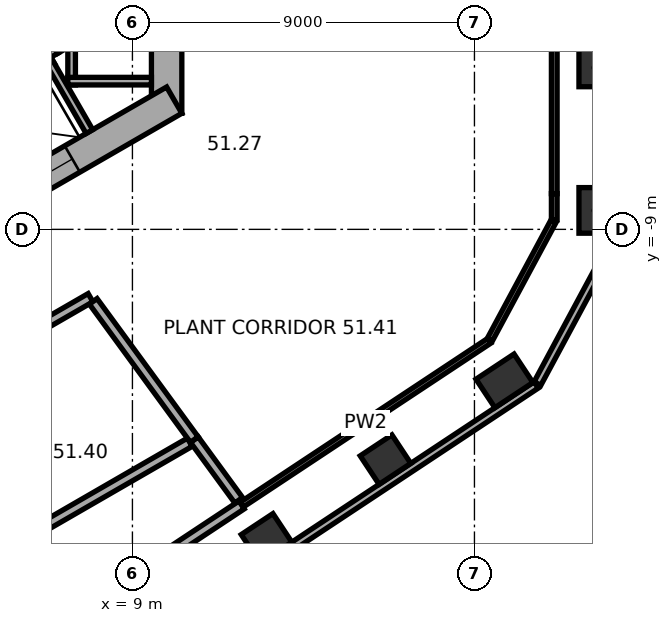
"""IFC4 building model, lengths in metres.
Left out: names, types, materials, properties, quantities, classifications, styles, units other than length and angle.
Written with IfcOpenShell. Run it as: python <this file> out.ifc"""

import sys

from ifc_helpers import new_model, si_unit, direction, frame, frame_2d, origin, origin_2d, place, context, subcontext, project, spatial, rectangle, extrude, element, fill, save


model = new_model("IFC4")
c1 = context("Model", 3, precision=1e-05, world=origin(), true_north=direction((0.0, 1.0)))
c2 = subcontext(c1, "Body", "Model", "MODEL_VIEW")
j1 = project(units=[si_unit("LENGTHUNIT", "METRE"), si_unit("PLANEANGLEUNIT", "RADIAN")], contexts=[c1])
p1 = place(None, origin())
s1 = spatial("IfcSite", under=j1, at=p1, CompositionType="ELEMENT")
p2 = place(p1, origin())
s2 = spatial("IfcBuilding", under=s1, at=p2, CompositionType="ELEMENT")
p3 = place(p2, frame((0.0, 0.0, 205.8)))
s3 = spatial("IfcBuildingStorey", under=s2, at=p3, CompositionType="ELEMENT", Elevation=205.8)
p4 = place(p3, frame((21.2, -8.501, 0.0), z_axis=(0.0, 0.0, 1.0), x_axis=(0.0, 1.0, 0.0)))
e1 = element("IfcColumn", 1, at=p4, inside=s3, PredefinedType="COLUMN", context=c2, shape_type="SweptSolid", body=[
    extrude(rectangle(XDim=1.2, YDim=0.9, at=origin_2d()), origin(), (0.0, 0.0, 1.0), 4.8),
])
for number, where, z_axis, x_axis in (
    (2, (21.2, -4.747, 0.0), (0.0, 0.0, 1.0), (0.0, 1.0, 0.0)),
    (3, (12.529, -17.13, 0.0), (0.0, 0.0, 1.0), (0.834, 0.552, 0.0)),
    (4, (15.659, -15.058, 0.0), (0.0, 0.0, 1.0), (0.834, 0.552, 0.0)),
):
    element("IfcColumn", number, at=place(p3, frame(where, z_axis=z_axis, x_axis=x_axis)), inside=s3, PredefinedType="COLUMN", context=c2, shape_type="SweptSolid", body=[
        extrude(rectangle(XDim=1.0, YDim=0.9, at=origin_2d()), origin(), (0.0, 0.0, 1.0), 4.8),
    ])
p5 = place(p3, frame((18.79, -12.986, 0.0), z_axis=(0.0, 0.0, 1.0), x_axis=(0.833885822067, 0.551936985312, 0.0)))
e5 = element("IfcColumn", 5, at=p5, inside=s3, PredefinedType="COLUMN", context=c2, shape_type="SweptSolid", body=[
    extrude(rectangle(XDim=1.2, YDim=0.9, at=origin_2d()), origin(), (0.0, 0.0, 1.0), 4.8),
])
p6 = place(p3, frame((9.9, -5.947, 0.0), z_axis=(0.0, 0.0, 1.0), x_axis=(0.0, 1.0, 0.0)))
e6 = element("IfcWall", 6, at=p6, inside=s3, PredefinedType="SHEAR", context=c2, shape_type="SweptSolid", body=[
    extrude(rectangle(XDim=11.894, YDim=0.8, at=frame_2d((5.947, 0.0))), origin(), (0.0, 0.0, 1.0), 4.8),
])
p7 = place(p6, frame((6.147, 0.0, 0.0)))
e7 = element("IfcOpeningElement", 7, at=p7, cuts=e6, PredefinedType="OPENING", context=c2, shape_type="SweptSolid", body=[
    extrude(rectangle(XDim=1.5, YDim=2.1, at=frame_2d((0.75, 1.05))), frame((0.0, 0.41, 0.0), z_axis=(0.0, -1.0, 0.0), x_axis=(1.0, 0.0, 0.0)), (0.0, 0.0, 1.0), 0.82),
])
p8 = place(p6, frame((2.997, 0.0, 0.0)))
e8 = element("IfcOpeningElement", 8, at=p8, cuts=e6, PredefinedType="OPENING", context=c2, shape_type="SweptSolid", body=[
    extrude(rectangle(XDim=0.9, YDim=2.1, at=frame_2d((0.45, 1.05))), frame((0.0, 0.41, 0.0), z_axis=(0.0, -1.0, 0.0), x_axis=(1.0, 0.0, 0.0)), (0.0, 0.0, 1.0), 0.82),
])
p9 = place(p3, frame((-0.2, -11.547, 0.0), z_axis=(0.0, 0.0, 1.0), x_axis=(0.866023897231, 0.500002609418, 0.0)))
e9 = element("IfcWall", 9, at=p9, inside=s3, PredefinedType="SHEAR", context=c2, shape_type="SweptSolid", body=[
    extrude(rectangle(XDim=11.894, YDim=0.8, at=frame_2d((5.947, 0.0))), origin(), (0.0, 0.0, 1.0), 4.8),
])
p10 = place(p9, frame((2.497, 0.0, 0.0)))
e10 = element("IfcOpeningElement", 10, at=p10, cuts=e9, PredefinedType="OPENING", context=c2, shape_type="SweptSolid", body=[
    extrude(rectangle(XDim=1.1, YDim=2.1, at=frame_2d((0.55, 1.05))), frame((0.0, 0.41, 0.0), z_axis=(0.0, -1.0, 0.0), x_axis=(1.0, 0.0, 0.0)), (0.0, 0.0, 1.0), 0.82),
])
p11 = place(p9, frame((5.097, 0.0, 0.0)))
e11 = element("IfcOpeningElement", 11, at=p11, cuts=e9, PredefinedType="OPENING", context=c2, shape_type="SweptSolid", body=[
    extrude(rectangle(XDim=1.1, YDim=2.1, at=frame_2d((0.55, 1.05))), frame((0.0, 0.41, 0.0), z_axis=(0.0, -1.0, 0.0), x_axis=(1.0, 0.0, 0.0)), (0.0, 0.0, 1.0), 0.82),
])
p12 = place(p9, frame((7.697, 0.0, 0.0)))
e12 = element("IfcOpeningElement", 12, at=p12, cuts=e9, PredefinedType="OPENING", context=c2, shape_type="SweptSolid", body=[
    extrude(rectangle(XDim=1.1, YDim=2.1, at=frame_2d((0.55, 1.05))), frame((0.0, 0.41, 0.0), z_axis=(0.0, -1.0, 0.0), x_axis=(1.0, 0.0, 0.0)), (0.0, 0.0, 1.0), 0.82),
])
p13 = place(p3, frame((2.911, -24.156, 0.0), z_axis=(0.0, 0.0, 1.0), x_axis=(0.833882163564, 0.551942512668, 0.0)))
e13 = element("IfcWall", 13, at=p13, inside=s3, PredefinedType="STANDARD", context=c2, shape_type="SweptSolid", body=[
    extrude(rectangle(XDim=20.044, YDim=0.2, at=frame_2d((10.022, 0.0))), origin(), (0.0, 0.0, 1.0), 4.8),
])
p14 = place(p3, frame((19.658, -13.057, 0.0), z_axis=(0.0, 0.0, 1.0), x_axis=(0.473307879841, 0.880897071672, 0.0)))
e14 = element("IfcWall", 14, at=p14, inside=s3, PredefinedType="STANDARD", context=c2, shape_type="SweptSolid", body=[
    extrude(rectangle(XDim=4.395, YDim=0.2, at=frame_2d((2.197, 0.0))), origin(), (0.0, 0.0, 1.0), 4.8),
])
p15 = place(p3, frame((7.4, -5.2, 0.0), z_axis=(0.0, 0.0, 1.0), x_axis=(0.0, 1.0, 0.0)))
e15 = element("IfcWall", 15, at=p15, inside=s3, PredefinedType="PARTITIONING", context=c2, shape_type="SweptSolid", body=[
    extrude(rectangle(XDim=5.4, YDim=0.2, at=frame_2d((2.7, 0.0))), origin(), (0.0, 0.0, 1.0), 4.52),
])
p16 = place(p3, frame((7.3, -5.1, 0.0), z_axis=(0.0, 0.0, 1.0), x_axis=(1.0, 0.0, 0.0)))
e16 = element("IfcWall", 16, at=p16, inside=s3, PredefinedType="PARTITIONING", context=c2, shape_type="SweptSolid", body=[
    extrude(rectangle(XDim=2.2, YDim=0.2, at=frame_2d((1.1, 0.0))), origin(), (0.0, 0.0, 1.0), 4.52),
])
p17 = place(p3, frame((-0.024, -8.559, 0.0), z_axis=(0.0, 0.0, 1.0), x_axis=(0.866026010844, 0.49999894854, 0.0)))
e17 = element("IfcWall", 17, at=p17, inside=s3, PredefinedType="PARTITIONING", context=c2, shape_type="SweptSolid", body=[
    extrude(rectangle(XDim=8.0, YDim=0.2, at=frame_2d((4.0, 0.0))), origin(), (0.0, 0.0, 1.0), 4.52),
])
p18 = place(p3, frame((6.768, -4.522, 0.0), z_axis=(0.0, 0.0, 1.0), x_axis=(0.50002983664, -0.866008176907, 0.0)))
e18 = element("IfcWall", 18, at=p18, inside=s3, PredefinedType="PARTITIONING", context=c2, shape_type="SweptSolid", body=[
    extrude(rectangle(XDim=2.2, YDim=0.2, at=frame_2d((1.1, 0.0))), origin(), (0.0, 0.0, 1.0), 4.52),
])
p19 = place(p3, frame((4.816, -0.222, 0.0), z_axis=(0.0, 0.0, 1.0), x_axis=(0.499977259774, -0.866038532462, 0.0)))
e19 = element("IfcWall", 19, at=p19, inside=s3, PredefinedType="SHEAR", context=c2, shape_type="SweptSolid", body=[
    extrude(rectangle(XDim=4.7, YDim=0.3, at=frame_2d((2.35, 0.0))), origin(), (0.0, 0.0, 1.0), 4.52),
])
p20 = place(p3, frame((0.847, -7.767, 0.0), z_axis=(0.0, 0.0, 1.0), x_axis=(0.866027801685, 0.499995846692, 0.0)))
e20 = element("IfcWall", 20, at=p20, inside=s3, PredefinedType="SHEAR", context=c2, shape_type="SweptSolid", body=[
    extrude(rectangle(XDim=7.06, YDim=0.3, at=frame_2d((3.53, 0.0))), origin(), (0.0, 0.0, 1.0), 4.52),
])
p21 = place(p3, frame((11.873, -16.251, 0.0), z_axis=(0.0, 0.0, 1.0), x_axis=(-0.833861924464, -0.551973088953, 0.0)))
e21 = element("IfcWall", 21, at=p21, inside=s3, PredefinedType="SOLIDWALL", context=c2, shape_type="SweptSolid", body=[
    extrude(rectangle(XDim=10.651, YDim=0.25, at=frame_2d((5.326, 0.0))), origin(), (0.0, 0.0, 1.0), 4.02),
])
p22 = place(p3, frame((11.796, -16.128, 0.0), z_axis=(0.0, 0.0, 1.0), x_axis=(-0.59041584791, 0.807099204891, 0.0)))
e22 = element("IfcWall", 22, at=p22, inside=s3, PredefinedType="SOLIDWALL", context=c2, shape_type="SweptSolid", body=[
    extrude(rectangle(XDim=1.977, YDim=0.25, at=frame_2d((0.989, 0.0))), origin(), (0.0, 0.0, 1.0), 3.6),
])
p23 = place(p3, frame((10.508, -14.603, 0.0), z_axis=(0.0, 0.0, 1.0), x_axis=(-0.86603774239, -0.499978628299, 0.0)))
e23 = element("IfcWall", 23, at=p23, inside=s3, PredefinedType="SOLIDWALL", context=c2, shape_type="SweptSolid", body=[
    extrude(rectangle(XDim=9.157, YDim=0.25, at=frame_2d((4.579, 0.0))), origin(), (0.0, 0.0, 1.0), 4.52),
])
p24 = place(p3, frame((4.99, -12.476, 0.0), z_axis=(0.0, 0.0, 1.0), x_axis=(0.86607294768, 0.499917642513, 0.0)))
e24 = element("IfcWall", 24, at=p24, inside=s3, PredefinedType="SOLIDWALL", context=c2, shape_type="SweptSolid", body=[
    extrude(rectangle(XDim=3.356, YDim=0.25, at=frame_2d((1.678, 0.0))), origin(), (0.0, 0.0, 1.0), 4.52),
])
p25 = place(p3, frame((18.389, -11.933, 0.0), z_axis=(0.0, 0.0, 1.0), x_axis=(-0.833883730821, -0.551940144827, 0.0)))
e25 = element("IfcWall", 25, at=p25, inside=s3, PredefinedType="PARTITIONING", context=c2, shape_type="SweptSolid", body=[
    extrude(rectangle(XDim=7.806, YDim=0.15, at=frame_2d((3.903, 0.0))), origin(), (0.0, 0.0, 1.0), 4.02),
])
p26 = place(p3, frame((7.968, -10.895, 0.0), z_axis=(0.0, 0.0, 1.0), x_axis=(0.590348117022, -0.807148747585, 0.0)))
e26 = element("IfcWall", 26, at=p26, inside=s3, PredefinedType="SOLIDWALL", context=c2, shape_type="SweptSolid", body=[
    extrude(rectangle(XDim=4.504, YDim=0.25, at=frame_2d((2.252, 0.0))), origin(), (0.0, 0.0, 1.0), 3.6),
])
p27 = place(p3, frame((20.081, -8.784, 0.0), z_axis=(0.0, 0.0, 1.0), x_axis=(-0.473349998863, -0.880874439734, 0.0)))
e27 = element("IfcWall", 27, at=p27, inside=s3, PredefinedType="PARTITIONING", context=c2, shape_type="SweptSolid", body=[
    extrude(rectangle(XDim=3.535, YDim=0.15, at=frame_2d((1.767, 0.0))), origin(), (0.0, 0.0, 1.0), 4.52),
])
p28 = place(p3, frame((20.1, -8.06, 0.0), z_axis=(0.0, 0.0, 1.0), x_axis=(0.0, -1.0, 0.0)))
e28 = element("IfcWall", 28, at=p28, inside=s3, PredefinedType="PARTITIONING", context=c2, shape_type="SweptSolid", body=[
    extrude(rectangle(XDim=0.688, YDim=0.15, at=frame_2d((0.344, 0.0))), origin(), (0.0, 0.0, 1.0), 4.52),
])
p29 = place(p3, frame((20.1, 2.615, 0.0), z_axis=(0.0, 0.0, 1.0), x_axis=(0.0, -1.0, 0.0)))
e29 = element("IfcWall", 29, at=p29, inside=s3, PredefinedType="PARTITIONING", context=c2, shape_type="SweptSolid", body=[
    extrude(rectangle(XDim=10.676, YDim=0.15, at=frame_2d((5.338, 0.0))), origin(), (0.0, 0.0, 1.0), 4.02),
])
p30 = place(p12, origin())
e30 = element("IfcDoor", 30, at=p30, inside=s3, OperationType="DOUBLE_DOOR_SLIDING", PredefinedType="DOOR", context=c2, shape_type="SweptSolid", body=[
    extrude(rectangle(XDim=1.1, YDim=2.1, at=frame_2d((0.55, 1.05))), frame((0.0, 0.025, 0.0), z_axis=(0.0, -1.0, 0.0), x_axis=(1.0, 0.0, 0.0)), (0.0, 0.0, 1.0), 0.05),
])
fill(e12, e30)
save(model, sys.argv[1])
